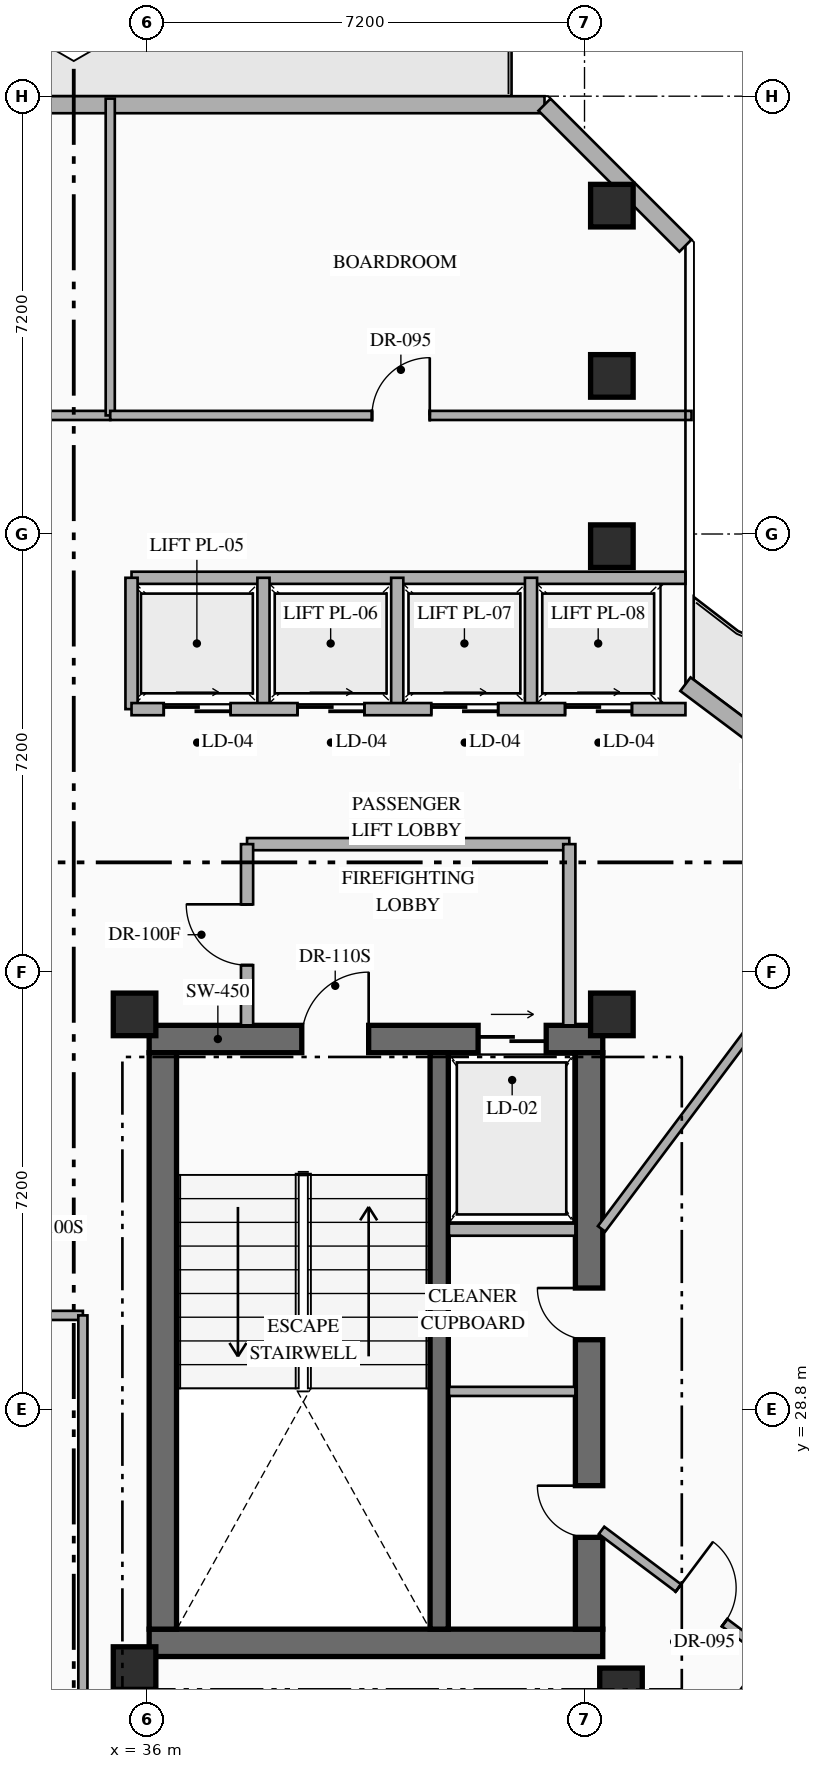
"""IFC4 building model, lengths in metres.
Left out: names, types, materials, properties, quantities, classifications, styles, units other than length and angle.
Written with IfcOpenShell. Run it as: python <this file> out.ifc"""

import sys

from ifc_helpers import new_model, si_unit, direction, frame, frame_2d, origin, origin_2d, place, context, subcontext, project, spatial, rectangle, hollow_rectangle, extrude, element, fill, save


model = new_model("IFC4")
c1 = context("Model", 3, precision=1e-05, world=origin(), true_north=direction((0.0, 1.0)))
c2 = subcontext(c1, "Body", "Model", "MODEL_VIEW")
j1 = project(units=[si_unit("LENGTHUNIT", "METRE"), si_unit("PLANEANGLEUNIT", "RADIAN")], contexts=[c1])
p1 = place(None, origin())
s1 = spatial("IfcSite", under=j1, at=p1, CompositionType="ELEMENT")
p2 = place(p1, origin())
s2 = spatial("IfcBuilding", under=s1, at=p2, CompositionType="ELEMENT")
p3 = place(p2, frame((0.0, 0.0, 231.15)))
s3 = spatial("IfcBuildingStorey", under=s2, at=p3, CompositionType="ELEMENT", Elevation=231.15)
p4 = place(p3, frame((36.04, 24.965, 0.0), z_axis=(0.0, 0.0, 1.0), x_axis=(1.0, 0.0, 0.0)))
e1 = element("IfcWall", 1, at=p4, inside=s3, PredefinedType="SHEAR", context=c2, shape_type="SweptSolid", body=[
    extrude(rectangle(XDim=7.46, YDim=0.45, at=frame_2d((3.73, 0.0))), origin(), (0.0, 0.0, 1.0), 3.6),
])
p5 = place(p3, frame((36.04, 34.895, 0.0), z_axis=(0.0, 0.0, 1.0), x_axis=(1.0, 0.0, 0.0)))
e2 = element("IfcWall", 2, at=p5, inside=s3, PredefinedType="SHEAR", context=c2, shape_type="SweptSolid", body=[
    extrude(rectangle(XDim=7.46, YDim=0.45, at=frame_2d((3.73, 0.0))), origin(), (0.0, 0.0, 1.0), 3.6),
])
p6 = place(p5, frame((2.51, 0.0, 0.0)))
e3 = element("IfcOpeningElement", 3, at=p6, cuts=e2, PredefinedType="OPENING", context=c2, shape_type="SweptSolid", body=[
    extrude(rectangle(XDim=1.1, YDim=2.2, at=frame_2d((0.55, 1.1))), frame((0.0, 0.235, 0.0), z_axis=(0.0, -1.0, 0.0), x_axis=(1.0, 0.0, 0.0)), (0.0, 0.0, 1.0), 0.47),
])
p7 = place(p5, frame((5.41, 0.0, 0.0)))
e4 = element("IfcOpeningElement", 4, at=p7, cuts=e2, PredefinedType="OPENING", context=c2, shape_type="SweptSolid", body=[
    extrude(rectangle(XDim=1.12, YDim=2.15, at=frame_2d((0.56, 1.075))), frame((0.0, 0.235, 0.0), z_axis=(0.0, -1.0, 0.0), x_axis=(1.0, 0.0, 0.0)), (0.0, 0.0, 1.0), 0.47),
])
p8 = place(p3, frame((36.265, 25.19, 0.0), z_axis=(0.0, 0.0, 1.0), x_axis=(0.0, 1.0, 0.0)))
e5 = element("IfcWall", 5, at=p8, inside=s3, PredefinedType="SHEAR", context=c2, shape_type="SweptSolid", body=[
    extrude(rectangle(XDim=9.48, YDim=0.45, at=frame_2d((4.74, 0.0))), origin(), (0.0, 0.0, 1.0), 3.6),
])
p9 = place(p3, frame((43.275, 25.19, 0.0), z_axis=(0.0, 0.0, 1.0), x_axis=(0.0, 1.0, 0.0)))
e6 = element("IfcWall", 6, at=p9, inside=s3, PredefinedType="SHEAR", context=c2, shape_type="SweptSolid", body=[
    extrude(rectangle(XDim=9.48, YDim=0.45, at=frame_2d((4.74, 0.0))), origin(), (0.0, 0.0, 1.0), 3.6),
])
p10 = place(p9, frame((1.51, 0.0, 0.0)))
e7 = element("IfcOpeningElement", 7, at=p10, cuts=e6, PredefinedType="OPENING", context=c2, shape_type="SweptSolid", body=[
    extrude(rectangle(XDim=0.85, YDim=2.08, at=frame_2d((0.425, 1.04))), frame((0.0, 0.235, 0.0), z_axis=(0.0, -1.0, 0.0), x_axis=(1.0, 0.0, 0.0)), (0.0, 0.0, 1.0), 0.47),
])
p11 = place(p9, frame((4.76, 0.0, 0.0)))
e8 = element("IfcOpeningElement", 8, at=p11, cuts=e6, PredefinedType="OPENING", context=c2, shape_type="SweptSolid", body=[
    extrude(rectangle(XDim=0.85, YDim=2.08, at=frame_2d((0.425, 1.04))), frame((0.0, 0.235, 0.0), z_axis=(0.0, -1.0, 0.0), x_axis=(1.0, 0.0, 0.0)), (0.0, 0.0, 1.0), 0.47),
])
p12 = place(p3, frame((40.81, 25.19, 0.0), z_axis=(0.0, 0.0, 1.0), x_axis=(0.0, 1.0, 0.0)))
e9 = element("IfcWall", 9, at=p12, inside=s3, PredefinedType="SHEAR", context=c2, shape_type="SweptSolid", body=[
    extrude(rectangle(XDim=9.48, YDim=0.3, at=frame_2d((4.74, 0.0))), origin(), (0.0, 0.0, 1.0), 3.6),
])
for number, where, z_axis, x_axis in (
    (10, (35.8, 24.55, 0.0), (0.0, 0.0, 1.0), (1.0, 0.0, 0.0)),
    (11, (43.8, 24.2, 0.0), (0.0, 0.0, 1.0), (1.0, 0.0, 0.0)),
    (12, (35.8, 35.3, 0.0), (0.0, 0.0, 1.0), (1.0, 0.0, 0.0)),
    (13, (43.65, 35.3, 0.0), (0.0, 0.0, 1.0), (1.0, 0.0, 0.0)),
    (14, (43.65, 43.0, 0.0), (0.0, 0.0, 1.0), (1.0, 0.0, 0.0)),
    (15, (43.65, 45.8, 0.0), (0.0, 0.0, 1.0), (1.0, 0.0, 0.0)),
    (16, (43.65, 48.6, 0.0), (0.0, 0.0, 1.0), (1.0, 0.0, 0.0)),
):
    element("IfcColumn", number, at=place(p3, frame(where, z_axis=z_axis, x_axis=x_axis)), inside=s3, PredefinedType="COLUMN", context=c2, shape_type="SweptSolid", body=[
        extrude(hollow_rectangle(XDim=0.7, YDim=0.7, WallThickness=0.028, at=origin_2d()), origin(), (0.0, 0.0, 1.0), 3.6),
    ])
p13 = place(p3, frame((44.86, 40.73, 0.0), z_axis=(0.0, 0.0, 1.0), x_axis=(0.800007624502, -0.599989833863, 0.0)))
e17 = element("IfcWall", 17, at=p13, inside=s3, PredefinedType="STANDARD", context=c2, shape_type="SweptSolid", body=[
    extrude(rectangle(XDim=19.212, YDim=0.28, at=frame_2d((9.606, 0.0))), origin(), (0.0, 0.0, 1.0), 3.3),
])
p14 = place(p13, frame((1.755, 0.0, 0.0)))
e18 = element("IfcOpeningElement", 18, at=p14, cuts=e17, PredefinedType="OPENING", context=c2, shape_type="SweptSolid", body=[
    extrude(rectangle(XDim=1.1, YDim=2.2, at=frame_2d((0.55, 1.1))), frame((0.0, 0.15, 0.0), z_axis=(0.0, -1.0, 0.0), x_axis=(1.0, 0.0, 0.0)), (0.0, 0.0, 1.0), 0.3),
])
p15 = place(p13, frame((13.509, 0.0, 0.85)))
e19 = element("IfcOpeningElement", 19, at=p15, cuts=e17, PredefinedType="OPENING", context=c2, shape_type="SweptSolid", body=[
    extrude(rectangle(XDim=1.8, YDim=2.1, at=frame_2d((0.9, 1.05))), frame((0.0, 0.15, 0.0), z_axis=(0.0, -1.0, 0.0), x_axis=(1.0, 0.0, 0.0)), (0.0, 0.0, 1.0), 0.3),
])
p16 = place(p3, frame((20.458, 50.26, 0.0), z_axis=(0.0, 0.0, 1.0), x_axis=(1.0, 0.0, 0.0)))
e20 = element("IfcWall", 20, at=p16, inside=s3, PredefinedType="STANDARD", context=c2, shape_type="SweptSolid", body=[
    extrude(rectangle(XDim=22.084, YDim=0.28, at=frame_2d((11.042, 0.0))), origin(), (0.0, 0.0, 1.0), 3.3),
])
p17 = place(p16, frame((2.1, 0.0, 0.0)))
e21 = element("IfcOpeningElement", 21, at=p17, cuts=e20, PredefinedType="OPENING", context=c2, shape_type="SweptSolid", body=[
    extrude(rectangle(XDim=1.1, YDim=2.2, at=frame_2d((0.55, 1.1))), frame((0.0, 0.15, 0.0), z_axis=(0.0, -1.0, 0.0), x_axis=(1.0, 0.0, 0.0)), (0.0, 0.0, 1.0), 0.3),
])
p18 = place(p3, frame((42.542, 50.26, 0.0), z_axis=(0.0, 0.0, 1.0), x_axis=(0.707106781187, -0.707106781187, 0.0)))
e22 = element("IfcWall", 22, at=p18, inside=s3, PredefinedType="STANDARD", context=c2, shape_type="SweptSolid", body=[
    extrude(rectangle(XDim=3.278, YDim=0.28, at=frame_2d((1.639, 0.0))), origin(), (0.0, 0.0, 1.0), 3.3),
])
p19 = place(p3, frame((40.97, 31.76, 0.0), z_axis=(0.0, 0.0, 1.0), x_axis=(1.0, 0.0, 0.0)))
e23 = element("IfcWall", 23, at=p19, inside=s3, PredefinedType="STANDARD", context=c2, shape_type="SweptSolid", body=[
    extrude(rectangle(XDim=2.08, YDim=0.2, at=frame_2d((1.04, 0.0))), origin(), (0.0, 0.0, 1.0), 3.3),
])
p20 = place(p3, frame((40.97, 29.1, 0.0), z_axis=(0.0, 0.0, 1.0), x_axis=(1.0, 0.0, 0.0)))
e24 = element("IfcWall", 24, at=p20, inside=s3, PredefinedType="PARTITIONING", context=c2, shape_type="SweptSolid", body=[
    extrude(rectangle(XDim=2.08, YDim=0.15, at=frame_2d((1.04, 0.0))), origin(), (0.0, 0.0, 1.0), 3.3),
])
p21 = place(p3, frame((37.65, 38.1, 0.0), z_axis=(0.0, 0.0, 1.0), x_axis=(1.0, 0.0, 0.0)))
e25 = element("IfcWall", 25, at=p21, inside=s3, PredefinedType="STANDARD", context=c2, shape_type="SweptSolid", body=[
    extrude(rectangle(XDim=5.3, YDim=0.2, at=frame_2d((2.65, 0.0))), origin(), (0.0, 0.0, 1.0), 3.3),
])
p22 = place(p3, frame((42.95, 35.12, 0.0), z_axis=(0.0, 0.0, 1.0), x_axis=(0.0, 1.0, 0.0)))
e26 = element("IfcWall", 26, at=p22, inside=s3, PredefinedType="STANDARD", context=c2, shape_type="SweptSolid", body=[
    extrude(rectangle(XDim=2.98, YDim=0.2, at=frame_2d((1.49, 0.0))), origin(), (0.0, 0.0, 1.0), 3.3),
])
p23 = place(p3, frame((37.65, 35.12, 0.0), z_axis=(0.0, 0.0, 1.0), x_axis=(0.0, 1.0, 0.0)))
e27 = element("IfcWall", 27, at=p23, inside=s3, PredefinedType="STANDARD", context=c2, shape_type="SweptSolid", body=[
    extrude(rectangle(XDim=2.98, YDim=0.2, at=frame_2d((1.49, 0.0))), origin(), (0.0, 0.0, 1.0), 3.3),
])
p24 = place(p23, frame((0.99, 0.0, 0.0)))
e28 = element("IfcOpeningElement", 28, at=p24, cuts=e27, PredefinedType="OPENING", context=c2, shape_type="SweptSolid", body=[
    extrude(rectangle(XDim=1.0, YDim=2.2, at=frame_2d((0.5, 1.1))), frame((0.0, 0.11, 0.0), z_axis=(0.0, -1.0, 0.0), x_axis=(1.0, 0.0, 0.0)), (0.0, 0.0, 1.0), 0.22),
])
p25 = place(p3, frame((35.75, 42.48, 0.0), z_axis=(0.0, 0.0, 1.0), x_axis=(1.0, 0.0, 0.0)))
e29 = element("IfcWall", 29, at=p25, inside=s3, PredefinedType="STANDARD", context=c2, shape_type="SweptSolid", body=[
    extrude(rectangle(XDim=9.11, YDim=0.2, at=frame_2d((4.555, 0.0))), origin(), (0.0, 0.0, 1.0), 3.3),
])
for number, where, z_axis, x_axis in (
    (30, (35.75, 40.32, 0.0), (0.0, 0.0, 1.0), (0.0, 1.0, 0.0)),
    (31, (37.92, 40.32, 0.0), (0.0, 0.0, 1.0), (0.0, 1.0, 0.0)),
    (32, (40.12, 40.32, 0.0), (0.0, 0.0, 1.0), (0.0, 1.0, 0.0)),
    (33, (42.32, 40.32, 0.0), (0.0, 0.0, 1.0), (0.0, 1.0, 0.0)),
):
    element("IfcWall", number, at=place(p3, frame(where, z_axis=z_axis, x_axis=x_axis)), inside=s3, PredefinedType="STANDARD", context=c2, shape_type="SweptSolid", body=[
        extrude(rectangle(XDim=2.16, YDim=0.2, at=frame_2d((1.08, 0.0))), origin(), (0.0, 0.0, 1.0), 3.3),
    ])
p26 = place(p3, frame((35.75, 40.32, 0.0), z_axis=(0.0, 0.0, 1.0), x_axis=(1.0, 0.0, 0.0)))
e34 = element("IfcWall", 34, at=p26, inside=s3, PredefinedType="STANDARD", context=c2, shape_type="SweptSolid", body=[
    extrude(rectangle(XDim=9.11, YDim=0.2, at=frame_2d((4.555, 0.0))), origin(), (0.0, 0.0, 1.0), 3.3),
])
p27 = place(p26, frame((0.53, 0.0, 0.0)))
e35 = element("IfcOpeningElement", 35, at=p27, cuts=e34, PredefinedType="OPENING", context=c2, shape_type="SweptSolid", body=[
    extrude(rectangle(XDim=1.1, YDim=2.18, at=frame_2d((0.55, 1.09))), frame((0.0, 0.11, 0.0), z_axis=(0.0, -1.0, 0.0), x_axis=(1.0, 0.0, 0.0)), (0.0, 0.0, 1.0), 0.22),
])
p28 = place(p26, frame((2.73, 0.0, 0.0)))
e36 = element("IfcOpeningElement", 36, at=p28, cuts=e34, PredefinedType="OPENING", context=c2, shape_type="SweptSolid", body=[
    extrude(rectangle(XDim=1.1, YDim=2.18, at=frame_2d((0.55, 1.09))), frame((0.0, 0.11, 0.0), z_axis=(0.0, -1.0, 0.0), x_axis=(1.0, 0.0, 0.0)), (0.0, 0.0, 1.0), 0.22),
])
p29 = place(p26, frame((4.93, 0.0, 0.0)))
e37 = element("IfcOpeningElement", 37, at=p29, cuts=e34, PredefinedType="OPENING", context=c2, shape_type="SweptSolid", body=[
    extrude(rectangle(XDim=1.1, YDim=2.18, at=frame_2d((0.55, 1.09))), frame((0.0, 0.11, 0.0), z_axis=(0.0, -1.0, 0.0), x_axis=(1.0, 0.0, 0.0)), (0.0, 0.0, 1.0), 0.22),
])
p30 = place(p26, frame((7.13, 0.0, 0.0)))
e38 = element("IfcOpeningElement", 38, at=p30, cuts=e34, PredefinedType="OPENING", context=c2, shape_type="SweptSolid", body=[
    extrude(rectangle(XDim=1.1, YDim=2.18, at=frame_2d((0.55, 1.09))), frame((0.0, 0.11, 0.0), z_axis=(0.0, -1.0, 0.0), x_axis=(1.0, 0.0, 0.0)), (0.0, 0.0, 1.0), 0.22),
])
p31 = place(p3, frame((25.55, 30.35, 0.0), z_axis=(0.0, 0.0, 1.0), x_axis=(1.0, 0.0, 0.0)))
e39 = element("IfcWall", 39, at=p31, inside=s3, PredefinedType="PARTITIONING", context=c2, shape_type="SweptSolid", body=[
    extrude(rectangle(XDim=9.4, YDim=0.15, at=frame_2d((4.7, 0.0))), origin(), (0.0, 0.0, 1.0), 3.3),
])
p32 = place(p31, frame((7.638, 0.0, 0.0)))
e40 = element("IfcOpeningElement", 40, at=p32, cuts=e39, PredefinedType="OPENING", context=c2, shape_type="SweptSolid", body=[
    extrude(rectangle(XDim=1.0, YDim=2.15, at=frame_2d((0.5, 1.075))), frame((0.0, 0.085, 0.0), z_axis=(0.0, -1.0, 0.0), x_axis=(1.0, 0.0, 0.0)), (0.0, 0.0, 1.0), 0.17),
])
p33 = place(p3, frame((34.95, 23.2, 0.0), z_axis=(0.0, 0.0, 1.0), x_axis=(0.0, 1.0, 0.0)))
e41 = element("IfcWall", 41, at=p33, inside=s3, PredefinedType="PARTITIONING", context=c2, shape_type="SweptSolid", body=[
    extrude(rectangle(XDim=7.15, YDim=0.15, at=frame_2d((3.575, 0.0))), origin(), (0.0, 0.0, 1.0), 3.3),
])
p34 = place(p3, frame((26.8, 45.15, 0.0), z_axis=(0.0, 0.0, 1.0), x_axis=(1.0, 0.0, 0.0)))
e42 = element("IfcWall", 42, at=p34, inside=s3, PredefinedType="PARTITIONING", context=c2, shape_type="SweptSolid", body=[
    extrude(rectangle(XDim=8.6, YDim=0.15, at=frame_2d((4.3, 0.0))), origin(), (0.0, 0.0, 1.0), 3.3),
])
p35 = place(p34, frame((3.825, 0.0, 0.0)))
e43 = element("IfcOpeningElement", 43, at=p35, cuts=e42, PredefinedType="OPENING", context=c2, shape_type="SweptSolid", body=[
    extrude(rectangle(XDim=0.95, YDim=2.15, at=frame_2d((0.475, 1.075))), frame((0.0, 0.085, 0.0), z_axis=(0.0, -1.0, 0.0), x_axis=(1.0, 0.0, 0.0)), (0.0, 0.0, 1.0), 0.17),
])
p36 = place(p3, frame((35.4, 45.15, 0.0), z_axis=(0.0, 0.0, 1.0), x_axis=(0.0, 1.0, 0.0)))
e44 = element("IfcWall", 44, at=p36, inside=s3, PredefinedType="PARTITIONING", context=c2, shape_type="SweptSolid", body=[
    extrude(rectangle(XDim=5.21, YDim=0.15, at=frame_2d((2.605, 0.0))), origin(), (0.0, 0.0, 1.0), 3.3),
])
p37 = place(p3, frame((35.4, 45.15, 0.0), z_axis=(0.0, 0.0, 1.0), x_axis=(1.0, 0.0, 0.0)))
e45 = element("IfcWall", 45, at=p37, inside=s3, PredefinedType="PARTITIONING", context=c2, shape_type="SweptSolid", body=[
    extrude(rectangle(XDim=9.56, YDim=0.15, at=frame_2d((4.78, 0.0))), origin(), (0.0, 0.0, 1.0), 3.3),
])
p38 = place(p37, frame((4.305, 0.0, 0.0)))
e46 = element("IfcOpeningElement", 46, at=p38, cuts=e45, PredefinedType="OPENING", context=c2, shape_type="SweptSolid", body=[
    extrude(rectangle(XDim=0.95, YDim=2.15, at=frame_2d((0.475, 1.075))), frame((0.0, 0.085, 0.0), z_axis=(0.0, -1.0, 0.0), x_axis=(1.0, 0.0, 0.0)), (0.0, 0.0, 1.0), 0.17),
])
p39 = place(p3, frame((38.064, 13.802, 0.0), z_axis=(0.0, 0.0, 1.0), x_axis=(0.599997031734, 0.800002226191, 0.0)))
e47 = element("IfcWall", 47, at=p39, inside=s3, PredefinedType="PARTITIONING", context=c2, shape_type="SweptSolid", body=[
    extrude(rectangle(XDim=13.16, YDim=0.15, at=frame_2d((6.58, 0.0))), origin(), (0.0, 0.0, 1.0), 3.3),
])
p40 = place(p39, frame((6.105, 0.0, 0.0)))
e48 = element("IfcOpeningElement", 48, at=p40, cuts=e47, PredefinedType="OPENING", context=c2, shape_type="SweptSolid", body=[
    extrude(rectangle(XDim=0.95, YDim=2.15, at=frame_2d((0.475, 1.075))), frame((0.0, 0.085, 0.0), z_axis=(0.0, -1.0, 0.0), x_axis=(1.0, 0.0, 0.0)), (0.0, 0.0, 1.0), 0.17),
])
p41 = place(p3, frame((43.48, 26.815, 0.0), z_axis=(0.0, 0.0, 1.0), x_axis=(0.800008430676, -0.599988758934, 0.0)))
e49 = element("IfcWall", 49, at=p41, inside=s3, PredefinedType="PARTITIONING", context=c2, shape_type="SweptSolid", body=[
    extrude(rectangle(XDim=3.475, YDim=0.15, at=frame_2d((1.738, 0.0))), origin(), (0.0, 0.0, 1.0), 3.3),
])
p42 = place(p41, frame((1.58, 0.0, 0.0)))
e50 = element("IfcOpeningElement", 50, at=p42, cuts=e49, PredefinedType="OPENING", context=c2, shape_type="SweptSolid", body=[
    extrude(rectangle(XDim=0.95, YDim=2.15, at=frame_2d((0.475, 1.075))), frame((0.0, 0.085, 0.0), z_axis=(0.0, -1.0, 0.0), x_axis=(1.0, 0.0, 0.0)), (0.0, 0.0, 1.0), 0.17),
])
p43 = place(p3, frame((43.48, 31.773, 0.0), z_axis=(0.0, 0.0, 1.0), x_axis=(0.599971041729, 0.800021717885, 0.0)))
e51 = element("IfcWall", 51, at=p43, inside=s3, PredefinedType="PARTITIONING", context=c2, shape_type="SweptSolid", body=[
    extrude(rectangle(XDim=8.094, YDim=0.15, at=frame_2d((4.047, 0.0))), origin(), (0.0, 0.0, 1.0), 3.3),
])
p44 = place(p6, origin())
e52 = element("IfcDoor", 52, at=p44, inside=s3, OperationType="SINGLE_SWING_RIGHT", PredefinedType="DOOR", context=c2, shape_type="SweptSolid", body=[
    extrude(rectangle(XDim=1.1, YDim=2.2, at=frame_2d((0.55, 1.1))), frame((0.0, 0.025, 0.0), z_axis=(0.0, -1.0, 0.0), x_axis=(1.0, 0.0, 0.0)), (0.0, 0.0, 1.0), 0.05),
])
fill(e3, e52)
p45 = place(p7, origin())
e53 = element("IfcDoor", 53, at=p45, inside=s3, OperationType="SLIDING_TO_RIGHT", PredefinedType="USERDEFINED", context=c2, shape_type="SweptSolid", body=[
    extrude(rectangle(XDim=1.12, YDim=2.15, at=frame_2d((0.56, 1.075))), frame((0.0, 0.025, 0.0), z_axis=(0.0, -1.0, 0.0), x_axis=(1.0, 0.0, 0.0)), (0.0, 0.0, 1.0), 0.05),
])
fill(e4, e53)
p46 = place(p10, origin())
e54 = element("IfcDoor", 54, at=p46, inside=s3, OperationType="SINGLE_SWING_RIGHT", PredefinedType="DOOR", context=c2, shape_type="SweptSolid", body=[
    extrude(rectangle(XDim=0.85, YDim=2.08, at=frame_2d((0.425, 1.04))), frame((0.0, 0.025, 0.0), z_axis=(0.0, -1.0, 0.0), x_axis=(1.0, 0.0, 0.0)), (0.0, 0.0, 1.0), 0.05),
])
fill(e7, e54)
p47 = place(p11, origin())
e55 = element("IfcDoor", 55, at=p47, inside=s3, OperationType="SINGLE_SWING_RIGHT", PredefinedType="DOOR", context=c2, shape_type="SweptSolid", body=[
    extrude(rectangle(XDim=0.85, YDim=2.08, at=frame_2d((0.425, 1.04))), frame((0.0, 0.025, 0.0), z_axis=(0.0, -1.0, 0.0), x_axis=(1.0, 0.0, 0.0)), (0.0, 0.0, 1.0), 0.05),
])
fill(e8, e55)
p48 = place(p24, origin())
e56 = element("IfcDoor", 56, at=p48, inside=s3, OperationType="SINGLE_SWING_RIGHT", PredefinedType="DOOR", context=c2, shape_type="SweptSolid", body=[
    extrude(rectangle(XDim=1.0, YDim=2.2, at=frame_2d((0.5, 1.1))), frame((0.0, 0.025, 0.0), z_axis=(0.0, -1.0, 0.0), x_axis=(1.0, 0.0, 0.0)), (0.0, 0.0, 1.0), 0.05),
])
fill(e28, e56)
p49 = place(p27, origin())
e57 = element("IfcDoor", 57, at=p49, inside=s3, OperationType="SLIDING_TO_RIGHT", PredefinedType="USERDEFINED", context=c2, shape_type="SweptSolid", body=[
    extrude(rectangle(XDim=1.1, YDim=2.18, at=frame_2d((0.55, 1.09))), frame((0.0, 0.025, 0.0), z_axis=(0.0, -1.0, 0.0), x_axis=(1.0, 0.0, 0.0)), (0.0, 0.0, 1.0), 0.05),
])
fill(e35, e57)
p50 = place(p28, origin())
e58 = element("IfcDoor", 58, at=p50, inside=s3, OperationType="SLIDING_TO_RIGHT", PredefinedType="USERDEFINED", context=c2, shape_type="SweptSolid", body=[
    extrude(rectangle(XDim=1.1, YDim=2.18, at=frame_2d((0.55, 1.09))), frame((0.0, 0.025, 0.0), z_axis=(0.0, -1.0, 0.0), x_axis=(1.0, 0.0, 0.0)), (0.0, 0.0, 1.0), 0.05),
])
fill(e36, e58)
p51 = place(p29, origin())
e59 = element("IfcDoor", 59, at=p51, inside=s3, OperationType="SLIDING_TO_RIGHT", PredefinedType="USERDEFINED", context=c2, shape_type="SweptSolid", body=[
    extrude(rectangle(XDim=1.1, YDim=2.18, at=frame_2d((0.55, 1.09))), frame((0.0, 0.025, 0.0), z_axis=(0.0, -1.0, 0.0), x_axis=(1.0, 0.0, 0.0)), (0.0, 0.0, 1.0), 0.05),
])
fill(e37, e59)
p52 = place(p30, origin())
e60 = element("IfcDoor", 60, at=p52, inside=s3, OperationType="SLIDING_TO_RIGHT", PredefinedType="USERDEFINED", context=c2, shape_type="SweptSolid", body=[
    extrude(rectangle(XDim=1.1, YDim=2.18, at=frame_2d((0.55, 1.09))), frame((0.0, 0.025, 0.0), z_axis=(0.0, -1.0, 0.0), x_axis=(1.0, 0.0, 0.0)), (0.0, 0.0, 1.0), 0.05),
])
fill(e38, e60)
p53 = place(p38, origin())
e61 = element("IfcDoor", 61, at=p53, inside=s3, OperationType="SINGLE_SWING_RIGHT", PredefinedType="DOOR", context=c2, shape_type="SweptSolid", body=[
    extrude(rectangle(XDim=0.95, YDim=2.15, at=frame_2d((0.475, 1.075))), frame((0.0, 0.025, 0.0), z_axis=(0.0, -1.0, 0.0), x_axis=(1.0, 0.0, 0.0)), (0.0, 0.0, 1.0), 0.05),
])
fill(e46, e61)
p54 = place(p42, origin())
e62 = element("IfcDoor", 62, at=p54, inside=s3, OperationType="SINGLE_SWING_LEFT", PredefinedType="DOOR", context=c2, shape_type="SweptSolid", body=[
    extrude(rectangle(XDim=0.95, YDim=2.15, at=frame_2d((0.475, 1.075))), frame((0.0, 0.025, 0.0), z_axis=(0.0, -1.0, 0.0), x_axis=(1.0, 0.0, 0.0)), (0.0, 0.0, 1.0), 0.05),
])
fill(e50, e62)
save(model, sys.argv[1])
